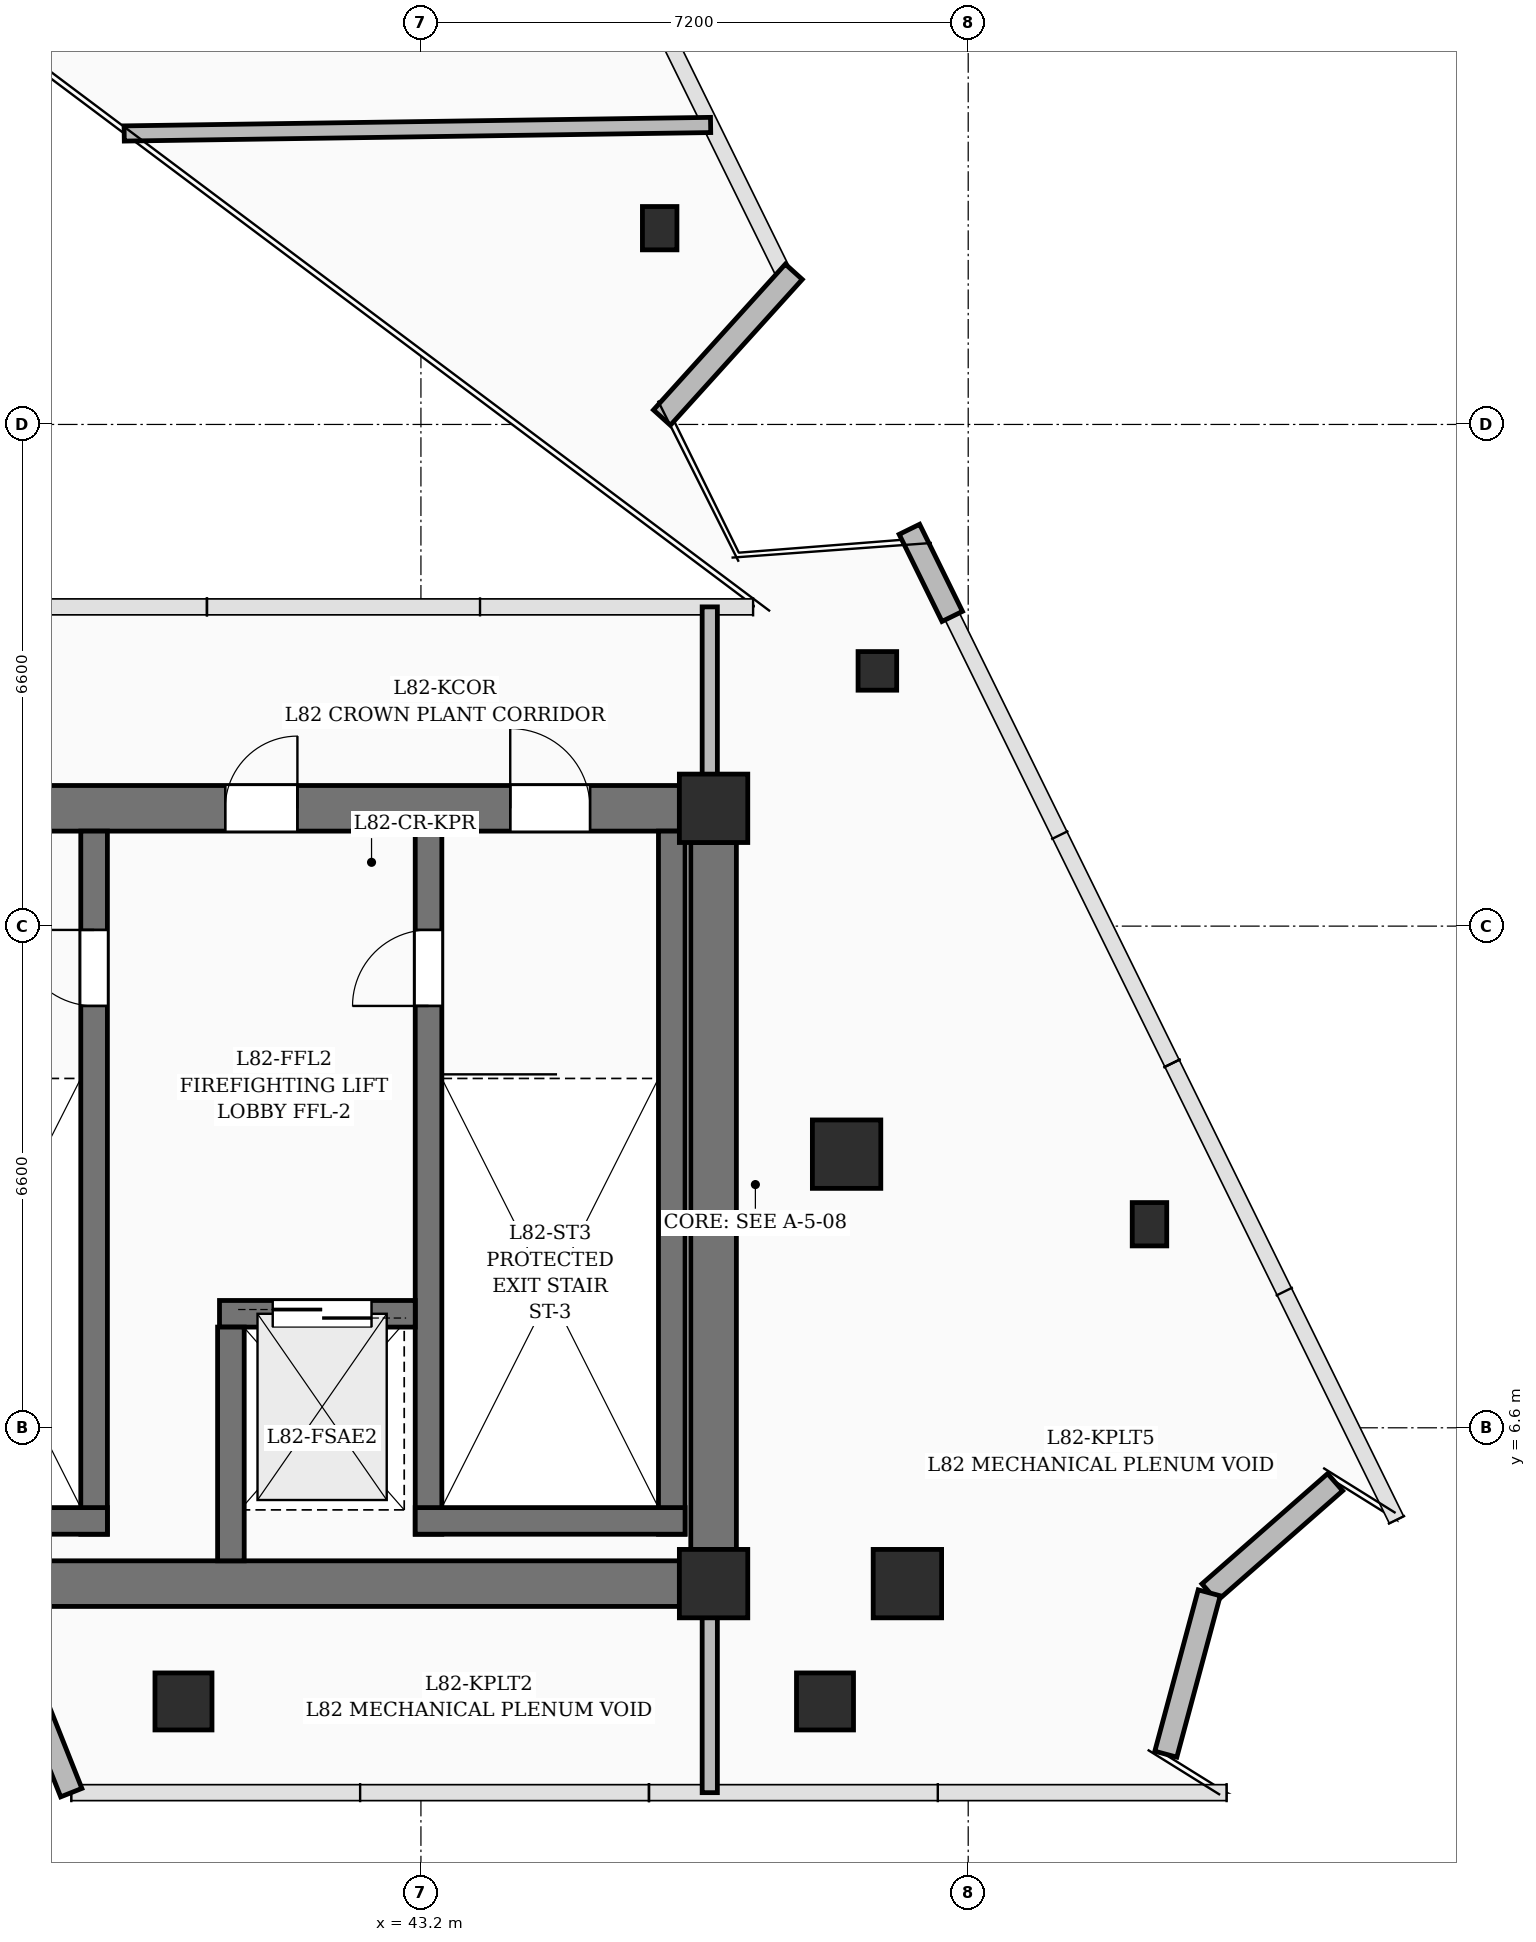
"""IFC4 building model, lengths in metres.
Left out: names, types, materials, properties, quantities, classifications, styles, units other than length and angle.
Written with IfcOpenShell. Run it as: python <this file> out.ifc"""

import sys

from ifc_helpers import new_model, si_unit, direction, frame, frame_2d, origin, origin_2d, place, context, subcontext, project, spatial, rectangle, hollow_circle, i_section, extrude, element, fill, save


model = new_model("IFC4")
c1 = context("Model", 3, precision=1e-05, world=origin(), true_north=direction((0.0, 1.0)))
c2 = subcontext(c1, "Body", "Model", "MODEL_VIEW")
j1 = project(units=[si_unit("LENGTHUNIT", "METRE"), si_unit("PLANEANGLEUNIT", "RADIAN")], contexts=[c1])
p1 = place(None, origin())
s1 = spatial("IfcSite", under=j1, at=p1, CompositionType="ELEMENT")
p2 = place(p1, origin())
s2 = spatial("IfcBuilding", under=s1, at=p2, CompositionType="ELEMENT")
p3 = place(p2, frame((0.0, 0.0, 318.5)))
s3 = spatial("IfcBuildingStorey", under=s2, at=p3, CompositionType="ELEMENT", Elevation=318.5)
for number, where, z_axis, x_axis in (
    (1, (47.05, 4.55, 0.0), (0.0, 0.0, 1.0), (1.0, 0.0, 0.0)),
    (2, (47.05, 14.75, 0.0), (0.0, 0.0, 1.0), (1.0, 0.0, 0.0)),
    (3, (49.6, 4.55, 0.0), (0.0, 0.0, 1.0), (1.0, 0.0, 0.0)),
    (4, (48.8, 10.2, 0.0), (0.0, 0.0, 1.0), (1.0, 0.0, 0.0)),
):
    element("IfcColumn", number, at=place(p3, frame(where, z_axis=z_axis, x_axis=x_axis)), inside=s3, PredefinedType="COLUMN", context=c2, shape_type="SweptSolid", body=[
        extrude(rectangle(XDim=0.9, YDim=0.9, at=origin_2d()), origin(), (0.0, 0.0, 1.0), 3.4),
    ])
p4 = place(p3, frame((35.6, 4.55, 0.0), z_axis=(0.0, 0.0, 1.0), x_axis=(1.0, 0.0, 0.0)))
e5 = element("IfcWall", 5, at=p4, inside=s3, PredefinedType="SHEAR", context=c2, shape_type="SweptSolid", body=[
    extrude(rectangle(XDim=11.0, YDim=0.6, at=frame_2d((5.5, 0.0))), origin(), (0.0, 0.0, 1.0), 3.4),
])
p5 = place(p3, frame((35.6, 14.75, 0.0), z_axis=(0.0, 0.0, 1.0), x_axis=(1.0, 0.0, 0.0)))
e6 = element("IfcWall", 6, at=p5, inside=s3, PredefinedType="SHEAR", context=c2, shape_type="SweptSolid", body=[
    extrude(rectangle(XDim=11.0, YDim=0.6, at=frame_2d((5.5, 0.0))), origin(), (0.0, 0.0, 1.0), 3.4),
])
p6 = place(p5, frame((1.175, 0.0, 0.0)))
e7 = element("IfcOpeningElement", 7, at=p6, cuts=e6, PredefinedType="OPENING", context=c2, shape_type="SweptSolid", body=[
    extrude(rectangle(XDim=1.05, YDim=2.15, at=frame_2d((0.525, 1.075))), frame((0.0, 0.31, 0.0), z_axis=(0.0, -1.0, 0.0), x_axis=(1.0, 0.0, 0.0)), (0.0, 0.0, 1.0), 0.62),
])
p7 = place(p5, frame((8.775, 0.0, 0.0)))
e8 = element("IfcOpeningElement", 8, at=p7, cuts=e6, PredefinedType="OPENING", context=c2, shape_type="SweptSolid", body=[
    extrude(rectangle(XDim=1.05, YDim=2.15, at=frame_2d((0.525, 1.075))), frame((0.0, 0.31, 0.0), z_axis=(0.0, -1.0, 0.0), x_axis=(1.0, 0.0, 0.0)), (0.0, 0.0, 1.0), 0.62),
])
p8 = place(p5, frame((5.025, 0.0, 0.0)))
e9 = element("IfcOpeningElement", 9, at=p8, cuts=e6, PredefinedType="OPENING", context=c2, shape_type="SweptSolid", body=[
    extrude(rectangle(XDim=0.95, YDim=2.15, at=frame_2d((0.475, 1.075))), frame((0.0, 0.31, 0.0), z_axis=(0.0, -1.0, 0.0), x_axis=(1.0, 0.0, 0.0)), (0.0, 0.0, 1.0), 0.62),
])
p9 = place(p3, frame((47.05, 5.0, 0.0), z_axis=(0.0, 0.0, 1.0), x_axis=(0.0, 1.0, 0.0)))
e10 = element("IfcWall", 10, at=p9, inside=s3, PredefinedType="SHEAR", context=c2, shape_type="SweptSolid", body=[
    extrude(rectangle(XDim=9.3, YDim=0.6, at=frame_2d((4.65, 0.0))), origin(), (0.0, 0.0, 1.0), 3.4),
])
p10 = place(p3, frame((38.9, 5.2, 0.0), z_axis=(0.0, 0.0, 1.0), x_axis=(0.0, 1.0, 0.0)))
e11 = element("IfcWall", 11, at=p10, inside=s3, PredefinedType="SOLIDWALL", context=c2, shape_type="SweptSolid", body=[
    extrude(rectangle(XDim=9.25, YDim=0.35, at=frame_2d((4.625, 0.0))), origin(), (0.0, 0.0, 1.0), 3.4),
])
p11 = place(p10, frame((6.95, 0.0, 0.0)))
e12 = element("IfcOpeningElement", 12, at=p11, cuts=e11, PredefinedType="OPENING", context=c2, shape_type="SweptSolid", body=[
    extrude(rectangle(XDim=1.0, YDim=2.15, at=frame_2d((0.5, 1.075))), frame((0.0, 0.185, 0.0), z_axis=(0.0, -1.0, 0.0), x_axis=(1.0, 0.0, 0.0)), (0.0, 0.0, 1.0), 0.37),
])
p12 = place(p3, frame((35.525, 5.375, 0.0), z_axis=(0.0, 0.0, 1.0), x_axis=(1.0, 0.0, 0.0)))
e13 = element("IfcWall", 13, at=p12, inside=s3, PredefinedType="SOLIDWALL", context=c2, shape_type="SweptSolid", body=[
    extrude(rectangle(XDim=3.55, YDim=0.35, at=frame_2d((1.775, 0.0))), origin(), (0.0, 0.0, 1.0), 3.4),
])
p13 = place(p3, frame((43.3, 5.2, 0.0), z_axis=(0.0, 0.0, 1.0), x_axis=(0.0, 1.0, 0.0)))
e14 = element("IfcWall", 14, at=p13, inside=s3, PredefinedType="SOLIDWALL", context=c2, shape_type="SweptSolid", body=[
    extrude(rectangle(XDim=9.25, YDim=0.35, at=frame_2d((4.625, 0.0))), origin(), (0.0, 0.0, 1.0), 3.4),
])
p14 = place(p13, frame((6.95, 0.0, 0.0)))
e15 = element("IfcOpeningElement", 15, at=p14, cuts=e14, PredefinedType="OPENING", context=c2, shape_type="SweptSolid", body=[
    extrude(rectangle(XDim=1.0, YDim=2.15, at=frame_2d((0.5, 1.075))), frame((0.0, 0.185, 0.0), z_axis=(0.0, -1.0, 0.0), x_axis=(1.0, 0.0, 0.0)), (0.0, 0.0, 1.0), 0.37),
])
p15 = place(p3, frame((46.5, 5.2, 0.0), z_axis=(0.0, 0.0, 1.0), x_axis=(0.0, 1.0, 0.0)))
e16 = element("IfcWall", 16, at=p15, inside=s3, PredefinedType="SOLIDWALL", context=c2, shape_type="SweptSolid", body=[
    extrude(rectangle(XDim=9.25, YDim=0.35, at=frame_2d((4.625, 0.0))), origin(), (0.0, 0.0, 1.0), 3.4),
])
p16 = place(p3, frame((43.125, 5.375, 0.0), z_axis=(0.0, 0.0, 1.0), x_axis=(1.0, 0.0, 0.0)))
e17 = element("IfcWall", 17, at=p16, inside=s3, PredefinedType="SOLIDWALL", context=c2, shape_type="SweptSolid", body=[
    extrude(rectangle(XDim=3.55, YDim=0.35, at=frame_2d((1.775, 0.0))), origin(), (0.0, 0.0, 1.0), 3.4),
])
p17 = place(p3, frame((40.55, 8.1, 0.0), z_axis=(0.0, 0.0, 1.0), x_axis=(1.0, 0.0, 0.0)))
e18 = element("IfcWall", 18, at=p17, inside=s3, PredefinedType="SOLIDWALL", context=c2, shape_type="SweptSolid", body=[
    extrude(rectangle(XDim=2.575, YDim=0.35, at=frame_2d((1.288, 0.0))), origin(), (0.0, 0.0, 1.0), 3.4),
])
p18 = place(p17, frame((0.7, 0.0, 0.0)))
e19 = element("IfcOpeningElement", 19, at=p18, cuts=e18, PredefinedType="OPENING", context=c2, shape_type="SweptSolid", body=[
    extrude(rectangle(XDim=1.3, YDim=2.25, at=frame_2d((0.65, 1.125))), frame((0.0, 0.185, 0.0), z_axis=(0.0, -1.0, 0.0), x_axis=(1.0, 0.0, 0.0)), (0.0, 0.0, 1.0), 0.37),
])
p19 = place(p3, frame((40.7, 4.85, 0.0), z_axis=(0.0, 0.0, 1.0), x_axis=(0.0, 1.0, 0.0)))
e20 = element("IfcWall", 20, at=p19, inside=s3, PredefinedType="SOLIDWALL", context=c2, shape_type="SweptSolid", body=[
    extrude(rectangle(XDim=3.075, YDim=0.35, at=frame_2d((1.538, 0.0))), origin(), (0.0, 0.0, 1.0), 3.4),
])
for number, where, z_axis, x_axis in (
    (21, (40.076, 3.0, 0.0), (0.0, 0.0, 1.0), (1.0, 0.0, 0.0)),
    (22, (48.516, 3.0, 0.0), (0.0, 0.0, 1.0), (1.0, 0.0, 0.0)),
):
    element("IfcColumn", number, at=place(p3, frame(where, z_axis=z_axis, x_axis=x_axis)), inside=s3, PredefinedType="COLUMN", context=c2, shape_type="SweptSolid", body=[
        extrude(rectangle(XDim=0.75, YDim=0.75, at=origin_2d()), origin(), (0.0, 0.0, 1.0), 3.4),
    ])
p20 = place(p3, frame((52.785, 9.278, 0.0), z_axis=(0.0, 0.0, 1.0), x_axis=(1.0, 0.0, 0.0)))
e23 = element("IfcColumn", 23, at=p20, inside=s3, PredefinedType="COLUMN", context=c2, shape_type="SweptSolid", body=[
    extrude(i_section(OverallWidth=0.454, OverallDepth=0.57, WebThickness=0.078, FlangeThickness=0.094, FilletRadius=0.02, at=origin_2d()), origin(), (0.0, 0.0, 1.0), 3.4),
])
p21 = place(p3, frame((49.205, 16.558, 0.0), z_axis=(0.0, 0.0, 1.0), x_axis=(1.0, 0.0, 0.0)))
e24 = element("IfcColumn", 24, at=p21, inside=s3, PredefinedType="COLUMN", context=c2, shape_type="SweptSolid", body=[
    extrude(hollow_circle(Radius=0.254, WallThickness=0.016, at=origin_2d()), origin(), (0.0, 0.0, 1.0), 3.4),
])
p22 = place(p3, frame((46.341, 22.382, 0.0), z_axis=(0.0, 0.0, 1.0), x_axis=(1.0, 0.0, 0.0)))
e25 = element("IfcColumn", 25, at=p22, inside=s3, PredefinedType="COLUMN", context=c2, shape_type="SweptSolid", body=[
    extrude(i_section(OverallWidth=0.454, OverallDepth=0.57, WebThickness=0.078, FlangeThickness=0.094, FilletRadius=0.02, at=origin_2d()), origin(), (0.0, 0.0, 1.0), 2.995),
])
p23 = place(p3, frame((48.106, 21.809, 0.0), z_axis=(0.0, 0.0, 1.0), x_axis=(-0.670777387581, -0.741658746534, 0.0)))
e26 = element("IfcWall", 26, at=p23, inside=s3, PredefinedType="SOLIDWALL", context=c2, shape_type="SweptSolid", body=[
    extrude(rectangle(XDim=2.587, YDim=0.3, at=frame_2d((1.293, 0.0))), origin(), (0.0, 0.0, 1.0), 2.3),
])
p24 = place(p3, frame((49.626, 18.42, 0.0), z_axis=(0.0, 0.0, 1.0), x_axis=(0.441392834137, -0.897313972906, 0.0)))
e27 = element("IfcWall", 27, at=p24, inside=s3, PredefinedType="SOLIDWALL", context=c2, shape_type="SweptSolid", body=[
    extrude(rectangle(XDim=1.277, YDim=0.3, at=frame_2d((0.639, 0.0))), origin(), (0.0, 0.0, 1.0), 2.3),
])
p25 = place(p3, frame((55.227, 5.884, 0.0), z_axis=(0.0, 0.0, 1.0), x_axis=(-0.751785184768, -0.659408095161, 0.0)))
e28 = element("IfcWall", 28, at=p25, inside=s3, PredefinedType="SOLIDWALL", context=c2, shape_type="SweptSolid", body=[
    extrude(rectangle(XDim=2.199, YDim=0.3, at=frame_2d((1.1, 0.0))), origin(), (0.0, 0.0, 1.0), 3.4),
])
p26 = place(p3, frame((53.571, 4.429, 0.0), z_axis=(0.0, 0.0, 1.0), x_axis=(-0.259846037112, -0.965650059285, 0.0)))
e29 = element("IfcWall", 29, at=p26, inside=s3, PredefinedType="SOLIDWALL", context=c2, shape_type="SweptSolid", body=[
    extrude(rectangle(XDim=2.198, YDim=0.3, at=frame_2d((1.099, 0.0))), origin(), (0.0, 0.0, 1.0), 3.4),
])
p27 = place(p3, frame((38.6, 1.8, 0.0), z_axis=(0.0, 0.0, 1.0), x_axis=(-0.369518892364, 0.929223217632, 0.0)))
e30 = element("IfcWall", 30, at=p27, inside=s3, PredefinedType="SOLIDWALL", context=c2, shape_type="SweptSolid", body=[
    extrude(rectangle(XDim=2.655, YDim=0.3, at=frame_2d((1.327, 0.0))), origin(), (0.0, 0.0, 1.0), 3.4),
])
p28 = place(p3, frame((47.0, 1.8, 0.0), z_axis=(0.0, 0.0, 1.0), x_axis=(0.0, 1.0, 0.0)))
e31 = element("IfcWall", 31, at=p28, inside=s3, PredefinedType="PARTITIONING", context=c2, shape_type="SweptSolid", body=[
    extrude(rectangle(XDim=2.45, YDim=0.2, at=frame_2d((1.225, 0.0))), origin(), (0.0, 0.0, 1.0), 3.68),
])
p29 = place(p3, frame((47.0, 15.05, 0.0), z_axis=(0.0, 0.0, 1.0), x_axis=(0.0, 1.0, 0.0)))
e32 = element("IfcWall", 32, at=p29, inside=s3, PredefinedType="PARTITIONING", context=c2, shape_type="SweptSolid", body=[
    extrude(rectangle(XDim=2.35, YDim=0.2, at=frame_2d((1.175, 0.0))), origin(), (0.0, 0.0, 1.0), 3.68),
])
p30 = place(p3, frame((39.296, 23.628, 0.0), z_axis=(0.0, 0.0, 1.0), x_axis=(0.999894530955, 0.014523324886, 0.0)))
e33 = element("IfcWall", 33, at=p30, inside=s3, PredefinedType="PARTITIONING", context=c2, shape_type="SweptSolid", body=[
    extrude(rectangle(XDim=7.716, YDim=0.2, at=frame_2d((3.858, 0.0))), origin(), (0.0, 0.0, 1.0), 3.68),
])
p31 = place(p7, origin())
e34 = element("IfcDoor", 34, at=p31, inside=s3, OperationType="SINGLE_SWING_LEFT", PredefinedType="DOOR", context=c2, shape_type="SweptSolid", body=[
    extrude(rectangle(XDim=1.05, YDim=2.15, at=frame_2d((0.525, 1.075))), frame((0.0, 0.025, 0.0), z_axis=(0.0, -1.0, 0.0), x_axis=(1.0, 0.0, 0.0)), (0.0, 0.0, 1.0), 0.05),
])
fill(e8, e34)
p32 = place(p11, origin())
e35 = element("IfcDoor", 35, at=p32, inside=s3, OperationType="SINGLE_SWING_RIGHT", PredefinedType="DOOR", context=c2, shape_type="SweptSolid", body=[
    extrude(rectangle(XDim=1.0, YDim=2.15, at=frame_2d((0.5, 1.075))), frame((0.0, 0.025, 0.0), z_axis=(0.0, -1.0, 0.0), x_axis=(1.0, 0.0, 0.0)), (0.0, 0.0, 1.0), 0.05),
])
fill(e12, e35)
p33 = place(p14, origin())
e36 = element("IfcDoor", 36, at=p33, inside=s3, OperationType="SINGLE_SWING_LEFT", PredefinedType="DOOR", context=c2, shape_type="SweptSolid", body=[
    extrude(rectangle(XDim=1.0, YDim=2.15, at=frame_2d((0.5, 1.075))), frame((0.0, 0.025, 0.0), z_axis=(0.0, -1.0, 0.0), x_axis=(1.0, 0.0, 0.0)), (0.0, 0.0, 1.0), 0.05),
])
fill(e15, e36)
p34 = place(p18, origin())
e37 = element("IfcDoor", 37, at=p34, inside=s3, OperationType="DOUBLE_DOOR_SLIDING", PredefinedType="DOOR", context=c2, shape_type="SweptSolid", body=[
    extrude(rectangle(XDim=1.3, YDim=2.25, at=frame_2d((0.65, 1.125))), frame((0.0, 0.025, 0.0), z_axis=(0.0, -1.0, 0.0), x_axis=(1.0, 0.0, 0.0)), (0.0, 0.0, 1.0), 0.05),
])
fill(e19, e37)
p35 = place(p8, origin())
e38 = element("IfcDoor", 38, at=p35, inside=s3, OperationType="SINGLE_SWING_RIGHT", PredefinedType="DOOR", context=c2, shape_type="SweptSolid", body=[
    extrude(rectangle(XDim=0.95, YDim=2.15, at=frame_2d((0.475, 1.075))), frame((0.0, 0.025, 0.0), z_axis=(0.0, -1.0, 0.0), x_axis=(1.0, 0.0, 0.0)), (0.0, 0.0, 1.0), 0.05),
])
fill(e9, e38)
save(model, sys.argv[1])
